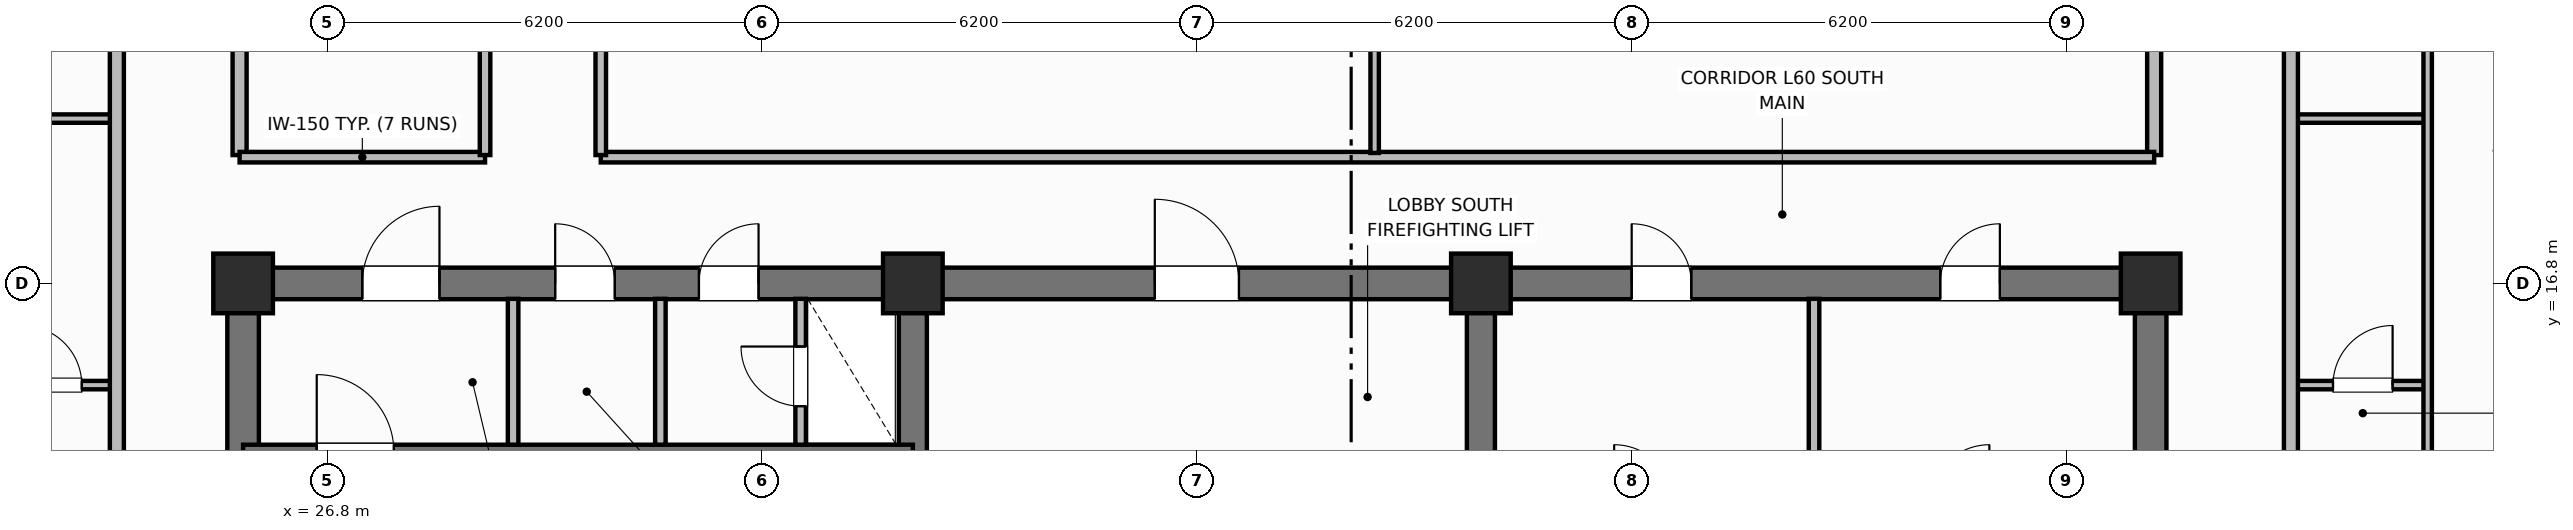
"""IFC4 building model, lengths in metres.
Left out: names, types, materials, properties, quantities, classifications, styles, units other than length and angle.
Written with IfcOpenShell. Run it as: python <this file> out.ifc"""

import sys

from ifc_helpers import new_model, si_unit, direction, frame, frame_2d, origin, origin_2d, place, context, subcontext, project, spatial, rectangle, extrude, element, fill, save


model = new_model("IFC4")
c1 = context("Model", 3, precision=1e-05, world=origin(), true_north=direction((0.0, 1.0)))
c2 = subcontext(c1, "Body", "Model", "MODEL_VIEW")
j1 = project(units=[si_unit("LENGTHUNIT", "METRE"), si_unit("PLANEANGLEUNIT", "RADIAN")], contexts=[c1])
p1 = place(None, origin())
s1 = spatial("IfcSite", under=j1, at=p1, CompositionType="ELEMENT")
p2 = place(p1, origin())
s2 = spatial("IfcBuilding", under=s1, at=p2, CompositionType="ELEMENT")
p3 = place(p2, frame((0.0, 0.0, 240.6)))
s3 = spatial("IfcBuildingStorey", under=s2, at=p3, CompositionType="ELEMENT", Elevation=240.6)
for number, where, z_axis, x_axis in (
    (1, (25.6, 10.825, 0.0), (0.0, 0.0, 1.0), (0.0, 1.0, 0.0)),
    (2, (52.8, 10.825, 0.0), (0.0, 0.0, 1.0), (0.0, 1.0, 0.0)),
):
    element("IfcWall", number, at=place(p3, frame(where, z_axis=z_axis, x_axis=x_axis)), inside=s3, PredefinedType="SHEAR", context=c2, shape_type="SweptSolid", body=[
        extrude(rectangle(XDim=5.75, YDim=0.45, at=frame_2d((2.875, 0.0))), origin(), (0.0, 0.0, 1.0), 3.7),
    ])
p4 = place(p3, frame((25.6, 16.8, 0.0), z_axis=(0.0, 0.0, 1.0), x_axis=(1.0, 0.0, 0.0)))
e3 = element("IfcWall", 3, at=p4, inside=s3, PredefinedType="SHEAR", context=c2, shape_type="SweptSolid", body=[
    extrude(rectangle(XDim=27.2, YDim=0.45, at=frame_2d((13.6, 0.0))), origin(), (0.0, 0.0, 1.0), 3.7),
])
p5 = place(p4, frame((1.7, 0.0, 0.0)))
e4 = element("IfcOpeningElement", 4, at=p5, cuts=e3, PredefinedType="OPENING", context=c2, shape_type="SweptSolid", body=[
    extrude(rectangle(XDim=1.1, YDim=2.15, at=frame_2d((0.55, 1.075))), frame((0.0, 0.235, 0.0), z_axis=(0.0, -1.0, 0.0), x_axis=(1.0, 0.0, 0.0)), (0.0, 0.0, 1.0), 0.47),
])
p6 = place(p4, frame((4.45, 0.0, 0.0)))
e5 = element("IfcOpeningElement", 5, at=p6, cuts=e3, PredefinedType="OPENING", context=c2, shape_type="SweptSolid", body=[
    extrude(rectangle(XDim=0.85, YDim=2.1, at=frame_2d((0.425, 1.05))), frame((0.0, 0.235, 0.0), z_axis=(0.0, -1.0, 0.0), x_axis=(1.0, 0.0, 0.0)), (0.0, 0.0, 1.0), 0.47),
])
p7 = place(p4, frame((6.5, 0.0, 0.0)))
e6 = element("IfcOpeningElement", 6, at=p7, cuts=e3, PredefinedType="OPENING", context=c2, shape_type="SweptSolid", body=[
    extrude(rectangle(XDim=0.85, YDim=2.1, at=frame_2d((0.425, 1.05))), frame((0.0, 0.235, 0.0), z_axis=(0.0, -1.0, 0.0), x_axis=(1.0, 0.0, 0.0)), (0.0, 0.0, 1.0), 0.47),
])
p8 = place(p4, frame((13.0, 0.0, 0.0)))
e7 = element("IfcOpeningElement", 7, at=p8, cuts=e3, PredefinedType="OPENING", context=c2, shape_type="SweptSolid", body=[
    extrude(rectangle(XDim=1.2, YDim=2.15, at=frame_2d((0.6, 1.075))), frame((0.0, 0.235, 0.0), z_axis=(0.0, -1.0, 0.0), x_axis=(1.0, 0.0, 0.0)), (0.0, 0.0, 1.0), 0.47),
])
p9 = place(p4, frame((19.8, 0.0, 0.0)))
e8 = element("IfcOpeningElement", 8, at=p9, cuts=e3, PredefinedType="OPENING", context=c2, shape_type="SweptSolid", body=[
    extrude(rectangle(XDim=0.85, YDim=2.1, at=frame_2d((0.425, 1.05))), frame((0.0, 0.235, 0.0), z_axis=(0.0, -1.0, 0.0), x_axis=(1.0, 0.0, 0.0)), (0.0, 0.0, 1.0), 0.47),
])
p10 = place(p4, frame((24.2, 0.0, 0.0)))
e9 = element("IfcOpeningElement", 9, at=p10, cuts=e3, PredefinedType="OPENING", context=c2, shape_type="SweptSolid", body=[
    extrude(rectangle(XDim=0.85, YDim=2.1, at=frame_2d((0.425, 1.05))), frame((0.0, 0.235, 0.0), z_axis=(0.0, -1.0, 0.0), x_axis=(1.0, 0.0, 0.0)), (0.0, 0.0, 1.0), 0.47),
])
for number, where, z_axis, x_axis in (
    (10, (35.15, 10.825, 0.0), (0.0, 0.0, 1.0), (0.0, 1.0, 0.0)),
    (11, (43.25, 10.825, 0.0), (0.0, 0.0, 1.0), (0.0, 1.0, 0.0)),
):
    element("IfcWall", number, at=place(p3, frame(where, z_axis=z_axis, x_axis=x_axis)), inside=s3, PredefinedType="SHEAR", context=c2, shape_type="SweptSolid", body=[
        extrude(rectangle(XDim=5.75, YDim=0.4, at=frame_2d((2.875, 0.0))), origin(), (0.0, 0.0, 1.0), 3.7),
    ])
for number, where, z_axis, x_axis in (
    (12, (25.6, 16.8, 0.0), (0.0, 0.0, 1.0), (1.0, 0.0, 0.0)),
    (13, (35.15, 16.8, 0.0), (0.0, 0.0, 1.0), (1.0, 0.0, 0.0)),
    (14, (43.25, 16.8, 0.0), (0.0, 0.0, 1.0), (1.0, 0.0, 0.0)),
    (15, (52.8, 16.8, 0.0), (0.0, 0.0, 1.0), (1.0, 0.0, 0.0)),
):
    element("IfcColumn", number, at=place(p3, frame(where, z_axis=z_axis, x_axis=x_axis)), inside=s3, PredefinedType="COLUMN", context=c2, shape_type="SweptSolid", body=[
        extrude(rectangle(XDim=0.85, YDim=0.85, at=origin_2d()), origin(), (0.0, 0.0, 1.0), 3.7),
    ])
p11 = place(p3, frame((25.6, 14.4, 0.0), z_axis=(0.0, 0.0, 1.0), x_axis=(1.0, 0.0, 0.0)))
e16 = element("IfcWall", 16, at=p11, inside=s3, PredefinedType="SHEAR", context=c2, shape_type="SweptSolid", body=[
    extrude(rectangle(XDim=9.55, YDim=0.2, at=frame_2d((4.775, 0.0))), origin(), (0.0, 0.0, 1.0), 3.7),
])
p12 = place(p11, frame((1.05, 0.0, 0.0)))
e17 = element("IfcOpeningElement", 17, at=p12, cuts=e16, PredefinedType="OPENING", context=c2, shape_type="SweptSolid", body=[
    extrude(rectangle(XDim=1.1, YDim=2.15, at=frame_2d((0.55, 1.075))), frame((0.0, 0.11, 0.0), z_axis=(0.0, -1.0, 0.0), x_axis=(1.0, 0.0, 0.0)), (0.0, 0.0, 1.0), 0.22),
])
for number, where, z_axis, x_axis in (
    (18, (29.45, 14.5, 0.0), (0.0, 0.0, 1.0), (0.0, 1.0, 0.0)),
    (19, (31.55, 14.5, 0.0), (0.0, 0.0, 1.0), (0.0, 1.0, 0.0)),
):
    element("IfcWall", number, at=place(p3, frame(where, z_axis=z_axis, x_axis=x_axis)), inside=s3, PredefinedType="PARTITIONING", context=c2, shape_type="SweptSolid", body=[
        extrude(rectangle(XDim=2.08, YDim=0.15, at=frame_2d((1.04, 0.0))), origin(), (0.0, 0.0, 1.0), 2.56),
    ])
p13 = place(p3, frame((33.55, 14.5, 0.0), z_axis=(0.0, 0.0, 1.0), x_axis=(0.0, 1.0, 0.0)))
e20 = element("IfcWall", 20, at=p13, inside=s3, PredefinedType="PARTITIONING", context=c2, shape_type="SweptSolid", body=[
    extrude(rectangle(XDim=2.08, YDim=0.15, at=frame_2d((1.04, 0.0))), origin(), (0.0, 0.0, 1.0), 2.56),
])
p14 = place(p13, frame((0.55, 0.0, 0.0)))
e21 = element("IfcOpeningElement", 21, at=p14, cuts=e20, PredefinedType="OPENING", context=c2, shape_type="SweptSolid", body=[
    extrude(rectangle(XDim=0.85, YDim=2.05, at=frame_2d((0.425, 1.025))), frame((0.0, 0.085, 0.0), z_axis=(0.0, -1.0, 0.0), x_axis=(1.0, 0.0, 0.0)), (0.0, 0.0, 1.0), 0.17),
])
p15 = place(p3, frame((48.0, 10.95, 0.0), z_axis=(0.0, 0.0, 1.0), x_axis=(0.0, 1.0, 0.0)))
e22 = element("IfcWall", 22, at=p15, inside=s3, PredefinedType="PARTITIONING", context=c2, shape_type="SweptSolid", body=[
    extrude(rectangle(XDim=5.63, YDim=0.15, at=frame_2d((2.815, 0.0))), origin(), (0.0, 0.0, 1.0), 2.56),
])
for number, where, z_axis, x_axis in (
    (23, (25.55, 18.63, 0.0), (0.0, 0.0, 1.0), (0.0, 1.0, 0.0)),
    (24, (52.85, 18.63, 0.0), (0.0, 0.0, 1.0), (0.0, 1.0, 0.0)),
):
    element("IfcWall", number, at=place(p3, frame(where, z_axis=z_axis, x_axis=x_axis)), inside=s3, PredefinedType="PARTITIONING", context=c2, shape_type="SweptSolid", body=[
        extrude(rectangle(XDim=19.14, YDim=0.2, at=frame_2d((9.57, 0.0))), origin(), (0.0, 0.0, 1.0), 2.56),
    ])
p16 = place(p3, frame((25.55, 18.6, 0.0), z_axis=(0.0, 0.0, 1.0), x_axis=(1.0, 0.0, 0.0)))
e25 = element("IfcWall", 25, at=p16, inside=s3, PredefinedType="PARTITIONING", context=c2, shape_type="SweptSolid", body=[
    extrude(rectangle(XDim=3.5, YDim=0.15, at=frame_2d((1.75, 0.0))), origin(), (0.0, 0.0, 1.0), 2.56),
])
p17 = place(p3, frame((30.7, 18.6, 0.0), z_axis=(0.0, 0.0, 1.0), x_axis=(1.0, 0.0, 0.0)))
e26 = element("IfcWall", 26, at=p17, inside=s3, PredefinedType="PARTITIONING", context=c2, shape_type="SweptSolid", body=[
    extrude(rectangle(XDim=22.15, YDim=0.15, at=frame_2d((11.075, 0.0))), origin(), (0.0, 0.0, 1.0), 2.56),
])
p18 = place(p3, frame((41.735, 18.66, 0.0), z_axis=(0.0, 0.0, 1.0), x_axis=(0.0, 1.0, 0.0)))
e27 = element("IfcWall", 27, at=p18, inside=s3, PredefinedType="PARTITIONING", context=c2, shape_type="SweptSolid", body=[
    extrude(rectangle(XDim=10.648, YDim=0.12, at=frame_2d((5.324, 0.0))), origin(), (0.0, 0.0, 1.0), 2.56),
])
p19 = place(p18, frame((2.0, 0.0, 0.0)))
e28 = element("IfcOpeningElement", 28, at=p19, cuts=e27, PredefinedType="OPENING", context=c2, shape_type="SweptSolid", body=[
    extrude(rectangle(XDim=0.9, YDim=2.1, at=frame_2d((0.45, 1.05))), frame((0.0, 0.07, 0.0), z_axis=(0.0, -1.0, 0.0), x_axis=(1.0, 0.0, 0.0)), (0.0, 0.0, 1.0), 0.14),
])
p20 = place(p3, frame((29.05, 18.63, 0.0), z_axis=(0.0, 0.0, 1.0), x_axis=(0.0, 1.0, 0.0)))
e29 = element("IfcWall", 29, at=p20, inside=s3, PredefinedType="PARTITIONING", context=c2, shape_type="SweptSolid", body=[
    extrude(rectangle(XDim=19.14, YDim=0.15, at=frame_2d((9.57, 0.0))), origin(), (0.0, 0.0, 1.0), 2.56),
])
p21 = place(p20, frame((5.5, 0.0, 0.0)))
e30 = element("IfcOpeningElement", 30, at=p21, cuts=e29, PredefinedType="OPENING", context=c2, shape_type="SweptSolid", body=[
    extrude(rectangle(XDim=1.0, YDim=2.15, at=frame_2d((0.5, 1.075))), frame((0.0, 0.085, 0.0), z_axis=(0.0, -1.0, 0.0), x_axis=(1.0, 0.0, 0.0)), (0.0, 0.0, 1.0), 0.17),
])
p22 = place(p3, frame((30.7, 18.63, 0.0), z_axis=(0.0, 0.0, 1.0), x_axis=(0.0, 1.0, 0.0)))
e31 = element("IfcWall", 31, at=p22, inside=s3, PredefinedType="PARTITIONING", context=c2, shape_type="SweptSolid", body=[
    extrude(rectangle(XDim=19.14, YDim=0.15, at=frame_2d((9.57, 0.0))), origin(), (0.0, 0.0, 1.0), 2.56),
])
p23 = place(p22, frame((2.2, 0.0, 0.0)))
e32 = element("IfcOpeningElement", 32, at=p23, cuts=e31, PredefinedType="OPENING", context=c2, shape_type="SweptSolid", body=[
    extrude(rectangle(XDim=1.0, YDim=2.15, at=frame_2d((0.5, 1.075))), frame((0.0, 0.085, 0.0), z_axis=(0.0, -1.0, 0.0), x_axis=(1.0, 0.0, 0.0)), (0.0, 0.0, 1.0), 0.17),
])
p24 = place(p22, frame((12.719, 0.0, 0.0)))
e33 = element("IfcOpeningElement", 33, at=p24, cuts=e31, PredefinedType="OPENING", context=c2, shape_type="SweptSolid", body=[
    extrude(rectangle(XDim=1.0, YDim=2.15, at=frame_2d((0.5, 1.075))), frame((0.0, 0.085, 0.0), z_axis=(0.0, -1.0, 0.0), x_axis=(1.0, 0.0, 0.0)), (0.0, 0.0, 1.0), 0.17),
])
p25 = place(p3, frame((21.85, 15.35, 0.0), z_axis=(0.0, 0.0, 1.0), x_axis=(1.0, 0.0, 0.0)))
e34 = element("IfcWall", 34, at=p25, inside=s3, PredefinedType="PARTITIONING", context=c2, shape_type="SweptSolid", body=[
    extrude(rectangle(XDim=1.95, YDim=0.12, at=frame_2d((0.975, 0.0))), origin(), (0.0, 0.0, 1.0), 2.56),
])
p26 = place(p25, frame((0.6, 0.0, 0.0)))
e35 = element("IfcOpeningElement", 35, at=p26, cuts=e34, PredefinedType="OPENING", context=c2, shape_type="SweptSolid", body=[
    extrude(rectangle(XDim=0.85, YDim=2.1, at=frame_2d((0.425, 1.05))), frame((0.0, 0.07, 0.0), z_axis=(0.0, -1.0, 0.0), x_axis=(1.0, 0.0, 0.0)), (0.0, 0.0, 1.0), 0.14),
])
p27 = place(p3, frame((21.85, 19.15, 0.0), z_axis=(0.0, 0.0, 1.0), x_axis=(1.0, 0.0, 0.0)))
e36 = element("IfcWall", 36, at=p27, inside=s3, PredefinedType="PARTITIONING", context=c2, shape_type="SweptSolid", body=[
    extrude(rectangle(XDim=1.95, YDim=0.12, at=frame_2d((0.975, 0.0))), origin(), (0.0, 0.0, 1.0), 2.56),
])
p28 = place(p3, frame((23.8, 9.95, 0.0), z_axis=(0.0, 0.0, 1.0), x_axis=(0.0, 1.0, 0.0)))
e37 = element("IfcWall", 37, at=p28, inside=s3, PredefinedType="PARTITIONING", context=c2, shape_type="SweptSolid", body=[
    extrude(rectangle(XDim=36.5, YDim=0.2, at=frame_2d((18.25, 0.0))), origin(), (0.0, 0.0, 1.0), 2.56),
])
p29 = place(p28, frame((3.25, 0.0, 0.0)))
e38 = element("IfcOpeningElement", 38, at=p29, cuts=e37, PredefinedType="OPENING", context=c2, shape_type="SweptSolid", body=[
    extrude(rectangle(XDim=1.0, YDim=2.15, at=frame_2d((0.5, 1.075))), frame((0.0, 0.11, 0.0), z_axis=(0.0, -1.0, 0.0), x_axis=(1.0, 0.0, 0.0)), (0.0, 0.0, 1.0), 0.22),
])
p30 = place(p28, frame((13.3, 0.0, 0.0)))
e39 = element("IfcOpeningElement", 39, at=p30, cuts=e37, PredefinedType="OPENING", context=c2, shape_type="SweptSolid", body=[
    extrude(rectangle(XDim=1.0, YDim=2.15, at=frame_2d((0.5, 1.075))), frame((0.0, 0.11, 0.0), z_axis=(0.0, -1.0, 0.0), x_axis=(1.0, 0.0, 0.0)), (0.0, 0.0, 1.0), 0.22),
])
p31 = place(p28, frame((25.005, 0.0, 0.0)))
e40 = element("IfcOpeningElement", 40, at=p31, cuts=e37, PredefinedType="OPENING", context=c2, shape_type="SweptSolid", body=[
    extrude(rectangle(XDim=1.0, YDim=2.15, at=frame_2d((0.5, 1.075))), frame((0.0, 0.11, 0.0), z_axis=(0.0, -1.0, 0.0), x_axis=(1.0, 0.0, 0.0)), (0.0, 0.0, 1.0), 0.22),
])
p32 = place(p3, frame((54.8, 15.35, 0.0), z_axis=(0.0, 0.0, 1.0), x_axis=(1.0, 0.0, 0.0)))
e41 = element("IfcWall", 41, at=p32, inside=s3, PredefinedType="PARTITIONING", context=c2, shape_type="SweptSolid", body=[
    extrude(rectangle(XDim=1.95, YDim=0.12, at=frame_2d((0.975, 0.0))), origin(), (0.0, 0.0, 1.0), 2.56),
])
p33 = place(p32, frame((0.6, 0.0, 0.0)))
e42 = element("IfcOpeningElement", 42, at=p33, cuts=e41, PredefinedType="OPENING", context=c2, shape_type="SweptSolid", body=[
    extrude(rectangle(XDim=0.85, YDim=2.1, at=frame_2d((0.425, 1.05))), frame((0.0, 0.07, 0.0), z_axis=(0.0, -1.0, 0.0), x_axis=(1.0, 0.0, 0.0)), (0.0, 0.0, 1.0), 0.14),
])
p34 = place(p3, frame((54.8, 19.15, 0.0), z_axis=(0.0, 0.0, 1.0), x_axis=(1.0, 0.0, 0.0)))
e43 = element("IfcWall", 43, at=p34, inside=s3, PredefinedType="PARTITIONING", context=c2, shape_type="SweptSolid", body=[
    extrude(rectangle(XDim=1.95, YDim=0.12, at=frame_2d((0.975, 0.0))), origin(), (0.0, 0.0, 1.0), 2.56),
])
p35 = place(p3, frame((56.75, 9.99, 0.0), z_axis=(0.0, 0.0, 1.0), x_axis=(0.0, 1.0, 0.0)))
e44 = element("IfcWall", 44, at=p35, inside=s3, PredefinedType="PARTITIONING", context=c2, shape_type="SweptSolid", body=[
    extrude(rectangle(XDim=12.33, YDim=0.12, at=frame_2d((6.165, 0.0))), origin(), (0.0, 0.0, 1.0), 2.56),
])
p36 = place(p35, frame((0.41, 0.0, 0.0)))
e45 = element("IfcOpeningElement", 45, at=p36, cuts=e44, PredefinedType="OPENING", context=c2, shape_type="SweptSolid", body=[
    extrude(rectangle(XDim=0.9, YDim=2.1, at=frame_2d((0.45, 1.05))), frame((0.0, 0.07, 0.0), z_axis=(0.0, -1.0, 0.0), x_axis=(1.0, 0.0, 0.0)), (0.0, 0.0, 1.0), 0.14),
])
p37 = place(p35, frame((10.34, 0.0, 0.0)))
e46 = element("IfcOpeningElement", 46, at=p37, cuts=e44, PredefinedType="OPENING", context=c2, shape_type="SweptSolid", body=[
    extrude(rectangle(XDim=0.82, YDim=2.08, at=frame_2d((0.41, 1.04))), frame((0.0, 0.07, 0.0), z_axis=(0.0, -1.0, 0.0), x_axis=(1.0, 0.0, 0.0)), (0.0, 0.0, 1.0), 0.14),
])
p38 = place(p3, frame((54.8, 9.95, 0.0), z_axis=(0.0, 0.0, 1.0), x_axis=(0.0, 1.0, 0.0)))
e47 = element("IfcWall", 47, at=p38, inside=s3, PredefinedType="PARTITIONING", context=c2, shape_type="SweptSolid", body=[
    extrude(rectangle(XDim=36.5, YDim=0.2, at=frame_2d((18.25, 0.0))), origin(), (0.0, 0.0, 1.0), 2.56),
])
p39 = place(p38, frame((3.25, 0.0, 0.0)))
e48 = element("IfcOpeningElement", 48, at=p39, cuts=e47, PredefinedType="OPENING", context=c2, shape_type="SweptSolid", body=[
    extrude(rectangle(XDim=1.0, YDim=2.15, at=frame_2d((0.5, 1.075))), frame((0.0, 0.11, 0.0), z_axis=(0.0, -1.0, 0.0), x_axis=(1.0, 0.0, 0.0)), (0.0, 0.0, 1.0), 0.22),
])
p40 = place(p38, frame((12.96, 0.0, 0.0)))
e49 = element("IfcOpeningElement", 49, at=p40, cuts=e47, PredefinedType="OPENING", context=c2, shape_type="SweptSolid", body=[
    extrude(rectangle(XDim=1.0, YDim=2.15, at=frame_2d((0.5, 1.075))), frame((0.0, 0.11, 0.0), z_axis=(0.0, -1.0, 0.0), x_axis=(1.0, 0.0, 0.0)), (0.0, 0.0, 1.0), 0.22),
])
p41 = place(p38, frame((24.3, 0.0, 0.0)))
e50 = element("IfcOpeningElement", 50, at=p41, cuts=e47, PredefinedType="OPENING", context=c2, shape_type="SweptSolid", body=[
    extrude(rectangle(XDim=1.0, YDim=2.15, at=frame_2d((0.5, 1.075))), frame((0.0, 0.11, 0.0), z_axis=(0.0, -1.0, 0.0), x_axis=(1.0, 0.0, 0.0)), (0.0, 0.0, 1.0), 0.22),
])
p42 = place(p12, origin())
e51 = element("IfcDoor", 51, at=p42, inside=s3, OperationType="SINGLE_SWING_LEFT", PredefinedType="DOOR", context=c2, shape_type="SweptSolid", body=[
    extrude(rectangle(XDim=1.1, YDim=2.15, at=frame_2d((0.55, 1.075))), frame((0.0, 0.025, 0.0), z_axis=(0.0, -1.0, 0.0), x_axis=(1.0, 0.0, 0.0)), (0.0, 0.0, 1.0), 0.05),
])
fill(e17, e51)
p43 = place(p14, origin())
e52 = element("IfcDoor", 52, at=p43, inside=s3, OperationType="SINGLE_SWING_RIGHT", PredefinedType="TRAPDOOR", context=c2, shape_type="SweptSolid", body=[
    extrude(rectangle(XDim=0.85, YDim=2.05, at=frame_2d((0.425, 1.025))), frame((0.0, 0.025, 0.0), z_axis=(0.0, -1.0, 0.0), x_axis=(1.0, 0.0, 0.0)), (0.0, 0.0, 1.0), 0.05),
])
fill(e21, e52)
p44 = place(p26, origin())
e53 = element("IfcDoor", 53, at=p44, inside=s3, OperationType="SINGLE_SWING_LEFT", PredefinedType="DOOR", context=c2, shape_type="SweptSolid", body=[
    extrude(rectangle(XDim=0.85, YDim=2.1, at=frame_2d((0.425, 1.05))), frame((0.0, 0.025, 0.0), z_axis=(0.0, -1.0, 0.0), x_axis=(1.0, 0.0, 0.0)), (0.0, 0.0, 1.0), 0.05),
])
fill(e35, e53)
p45 = place(p33, origin())
e54 = element("IfcDoor", 54, at=p45, inside=s3, OperationType="SINGLE_SWING_RIGHT", PredefinedType="DOOR", context=c2, shape_type="SweptSolid", body=[
    extrude(rectangle(XDim=0.85, YDim=2.1, at=frame_2d((0.425, 1.05))), frame((0.0, 0.025, 0.0), z_axis=(0.0, -1.0, 0.0), x_axis=(1.0, 0.0, 0.0)), (0.0, 0.0, 1.0), 0.05),
])
fill(e42, e54)
p46 = place(p5, origin())
e55 = element("IfcDoor", 55, at=p46, inside=s3, OperationType="SINGLE_SWING_RIGHT", PredefinedType="DOOR", context=c2, shape_type="SweptSolid", body=[
    extrude(rectangle(XDim=1.1, YDim=2.15, at=frame_2d((0.55, 1.075))), frame((0.0, 0.025, 0.0), z_axis=(0.0, -1.0, 0.0), x_axis=(1.0, 0.0, 0.0)), (0.0, 0.0, 1.0), 0.05),
])
fill(e4, e55)
p47 = place(p6, origin())
e56 = element("IfcDoor", 56, at=p47, inside=s3, OperationType="SINGLE_SWING_LEFT", PredefinedType="DOOR", context=c2, shape_type="SweptSolid", body=[
    extrude(rectangle(XDim=0.85, YDim=2.1, at=frame_2d((0.425, 1.05))), frame((0.0, 0.025, 0.0), z_axis=(0.0, -1.0, 0.0), x_axis=(1.0, 0.0, 0.0)), (0.0, 0.0, 1.0), 0.05),
])
fill(e5, e56)
p48 = place(p7, origin())
e57 = element("IfcDoor", 57, at=p48, inside=s3, OperationType="SINGLE_SWING_RIGHT", PredefinedType="DOOR", context=c2, shape_type="SweptSolid", body=[
    extrude(rectangle(XDim=0.85, YDim=2.1, at=frame_2d((0.425, 1.05))), frame((0.0, 0.025, 0.0), z_axis=(0.0, -1.0, 0.0), x_axis=(1.0, 0.0, 0.0)), (0.0, 0.0, 1.0), 0.05),
])
fill(e6, e57)
p49 = place(p8, origin())
e58 = element("IfcDoor", 58, at=p49, inside=s3, OperationType="SINGLE_SWING_LEFT", PredefinedType="DOOR", context=c2, shape_type="SweptSolid", body=[
    extrude(rectangle(XDim=1.2, YDim=2.15, at=frame_2d((0.6, 1.075))), frame((0.0, 0.025, 0.0), z_axis=(0.0, -1.0, 0.0), x_axis=(1.0, 0.0, 0.0)), (0.0, 0.0, 1.0), 0.05),
])
fill(e7, e58)
p50 = place(p9, origin())
e59 = element("IfcDoor", 59, at=p50, inside=s3, OperationType="SINGLE_SWING_LEFT", PredefinedType="DOOR", context=c2, shape_type="SweptSolid", body=[
    extrude(rectangle(XDim=0.85, YDim=2.1, at=frame_2d((0.425, 1.05))), frame((0.0, 0.025, 0.0), z_axis=(0.0, -1.0, 0.0), x_axis=(1.0, 0.0, 0.0)), (0.0, 0.0, 1.0), 0.05),
])
fill(e8, e59)
p51 = place(p10, origin())
e60 = element("IfcDoor", 60, at=p51, inside=s3, OperationType="SINGLE_SWING_RIGHT", PredefinedType="DOOR", context=c2, shape_type="SweptSolid", body=[
    extrude(rectangle(XDim=0.85, YDim=2.1, at=frame_2d((0.425, 1.05))), frame((0.0, 0.025, 0.0), z_axis=(0.0, -1.0, 0.0), x_axis=(1.0, 0.0, 0.0)), (0.0, 0.0, 1.0), 0.05),
])
fill(e9, e60)
save(model, sys.argv[1])
